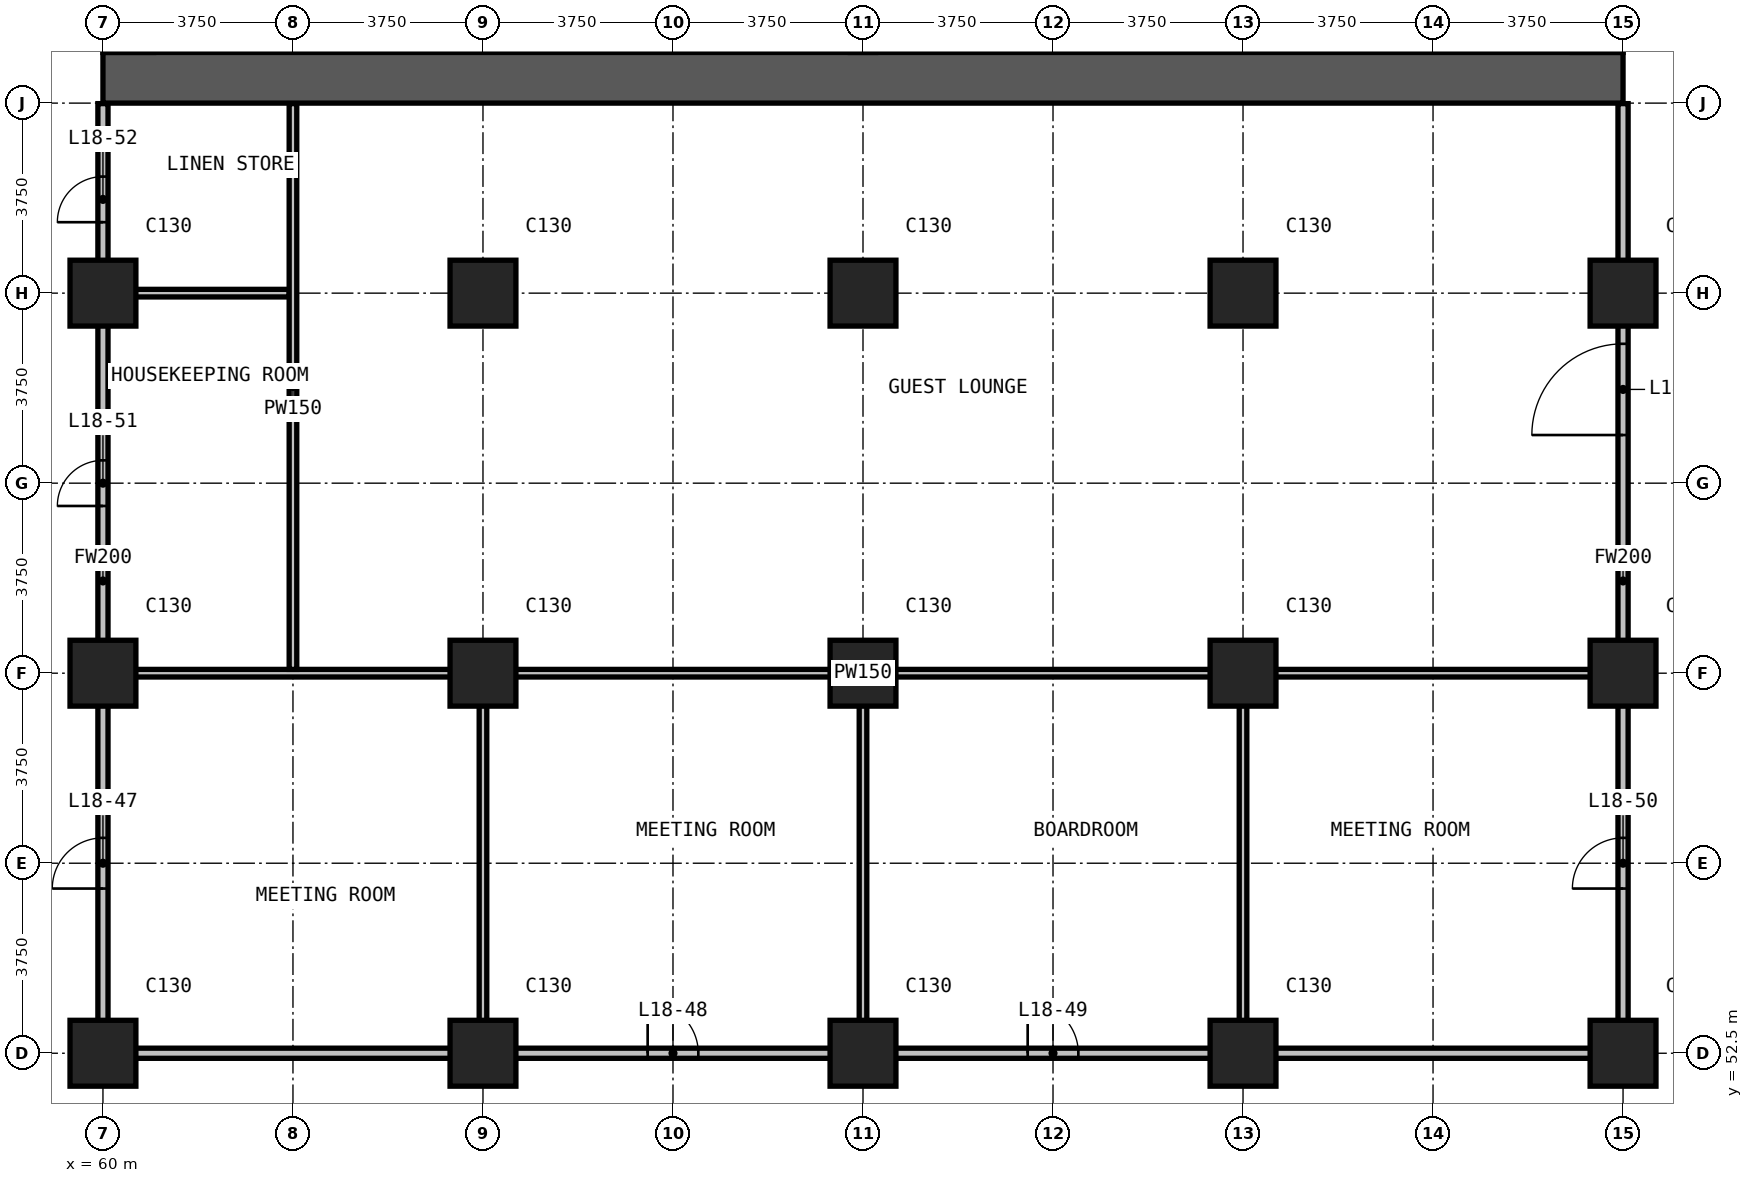
"""IFC4 building model, lengths in metres.
Left out: names, types, materials, properties, quantities, classifications, styles, units other than length and angle.
Written with IfcOpenShell. Run it as: python <this file> out.ifc"""

import sys

from ifc_helpers import new_model, si_unit, direction, frame, frame_2d, origin, origin_2d, place, context, subcontext, project, spatial, rectangle, extrude, element, fill, save


model = new_model("IFC4")
c1 = context("Model", 3, precision=1e-05, world=origin(), true_north=direction((0.0, 1.0)))
c2 = subcontext(c1, "Body", "Model", "MODEL_VIEW")
j1 = project(units=[si_unit("LENGTHUNIT", "METRE"), si_unit("PLANEANGLEUNIT", "RADIAN")], contexts=[c1])
p1 = place(None, origin())
s1 = spatial("IfcSite", under=j1, at=p1, CompositionType="ELEMENT")
p2 = place(p1, origin())
s2 = spatial("IfcBuilding", under=s1, at=p2, CompositionType="ELEMENT")
p3 = place(p2, frame((0.0, 0.0, 79.1)))
s3 = spatial("IfcBuildingStorey", under=s2, at=p3, CompositionType="ELEMENT", Elevation=79.1)
for number, where, z_axis, x_axis in (
    (1, (60.0, 52.5, 0.0), (0.0, 0.0, 1.0), (1.0, 0.0, 0.0)),
    (2, (60.0, 60.0, 0.0), (0.0, 0.0, 1.0), (1.0, 0.0, 0.0)),
    (3, (60.0, 67.5, 0.0), (0.0, 0.0, 1.0), (1.0, 0.0, 0.0)),
    (4, (67.5, 52.5, 0.0), (0.0, 0.0, 1.0), (1.0, 0.0, 0.0)),
    (5, (67.5, 60.0, 0.0), (0.0, 0.0, 1.0), (1.0, 0.0, 0.0)),
    (6, (67.5, 67.5, 0.0), (0.0, 0.0, 1.0), (1.0, 0.0, 0.0)),
    (7, (75.0, 52.5, 0.0), (0.0, 0.0, 1.0), (1.0, 0.0, 0.0)),
    (8, (75.0, 60.0, 0.0), (0.0, 0.0, 1.0), (1.0, 0.0, 0.0)),
    (9, (75.0, 67.5, 0.0), (0.0, 0.0, 1.0), (1.0, 0.0, 0.0)),
    (10, (82.5, 52.5, 0.0), (0.0, 0.0, 1.0), (1.0, 0.0, 0.0)),
    (11, (82.5, 60.0, 0.0), (0.0, 0.0, 1.0), (1.0, 0.0, 0.0)),
    (12, (82.5, 67.5, 0.0), (0.0, 0.0, 1.0), (1.0, 0.0, 0.0)),
    (13, (90.0, 52.5, 0.0), (0.0, 0.0, 1.0), (1.0, 0.0, 0.0)),
    (14, (90.0, 60.0, 0.0), (0.0, 0.0, 1.0), (1.0, 0.0, 0.0)),
    (15, (90.0, 67.5, 0.0), (0.0, 0.0, 1.0), (1.0, 0.0, 0.0)),
):
    element("IfcColumn", number, at=place(p3, frame(where, z_axis=z_axis, x_axis=x_axis)), inside=s3, PredefinedType="COLUMN", context=c2, shape_type="SweptSolid", body=[
        extrude(rectangle(XDim=1.3, YDim=1.3, at=origin_2d()), origin(), (0.0, 0.0, 1.0), 3.3),
    ])
p4 = place(p3, frame((60.0, 71.75, 0.0), z_axis=(0.0, 0.0, 1.0), x_axis=(1.0, 0.0, 0.0)))
e16 = element("IfcWall", 16, at=p4, inside=s3, PredefinedType="SHEAR", context=c2, shape_type="SweptSolid", body=[
    extrude(rectangle(XDim=30.0, YDim=1.0, at=frame_2d((15.0, 0.0))), origin(), (0.0, 0.0, 1.0), 3.3),
])
p5 = place(p3, frame((60.1, 52.5, 0.0), z_axis=(0.0, 0.0, 1.0), x_axis=(1.0, 0.0, 0.0)))
e17 = element("IfcWall", 17, at=p5, inside=s3, PredefinedType="PARTITIONING", context=c2, shape_type="SweptSolid", body=[
    extrude(rectangle(XDim=29.8, YDim=0.2, at=frame_2d((14.9, 0.0))), origin(), (0.0, 0.0, 1.0), 3.0),
])
p6 = place(p5, frame((10.65, 0.0, 0.0)))
e18 = element("IfcOpeningElement", 18, at=p6, cuts=e17, PredefinedType="OPENING", context=c2, shape_type="SweptSolid", body=[
    extrude(rectangle(XDim=1.0, YDim=2.2, at=frame_2d((0.5, 1.1))), frame((0.0, 0.11, 0.0), z_axis=(0.0, -1.0, 0.0), x_axis=(1.0, 0.0, 0.0)), (0.0, 0.0, 1.0), 0.22),
])
p7 = place(p5, frame((18.15, 0.0, 0.0)))
e19 = element("IfcOpeningElement", 19, at=p7, cuts=e17, PredefinedType="OPENING", context=c2, shape_type="SweptSolid", body=[
    extrude(rectangle(XDim=1.0, YDim=2.2, at=frame_2d((0.5, 1.1))), frame((0.0, 0.11, 0.0), z_axis=(0.0, -1.0, 0.0), x_axis=(1.0, 0.0, 0.0)), (0.0, 0.0, 1.0), 0.22),
])
p8 = place(p3, frame((60.0, 52.4, 0.0), z_axis=(0.0, 0.0, 1.0), x_axis=(0.0, 1.0, 0.0)))
e20 = element("IfcWall", 20, at=p8, inside=s3, PredefinedType="PARTITIONING", context=c2, shape_type="SweptSolid", body=[
    extrude(rectangle(XDim=18.84, YDim=0.2, at=frame_2d((9.42, 0.0))), origin(), (0.0, 0.0, 1.0), 3.0),
])
p9 = place(p8, frame((3.35, 0.0, 0.0)))
e21 = element("IfcOpeningElement", 21, at=p9, cuts=e20, PredefinedType="OPENING", context=c2, shape_type="SweptSolid", body=[
    extrude(rectangle(XDim=1.0, YDim=2.2, at=frame_2d((0.5, 1.1))), frame((0.0, 0.11, 0.0), z_axis=(0.0, -1.0, 0.0), x_axis=(1.0, 0.0, 0.0)), (0.0, 0.0, 1.0), 0.22),
])
p10 = place(p8, frame((10.9, 0.0, 0.0)))
e22 = element("IfcOpeningElement", 22, at=p10, cuts=e20, PredefinedType="OPENING", context=c2, shape_type="SweptSolid", body=[
    extrude(rectangle(XDim=0.9, YDim=2.2, at=frame_2d((0.45, 1.1))), frame((0.0, 0.11, 0.0), z_axis=(0.0, -1.0, 0.0), x_axis=(1.0, 0.0, 0.0)), (0.0, 0.0, 1.0), 0.22),
])
p11 = place(p8, frame((16.5, 0.0, 0.0)))
e23 = element("IfcOpeningElement", 23, at=p11, cuts=e20, PredefinedType="OPENING", context=c2, shape_type="SweptSolid", body=[
    extrude(rectangle(XDim=0.9, YDim=2.2, at=frame_2d((0.45, 1.1))), frame((0.0, 0.11, 0.0), z_axis=(0.0, -1.0, 0.0), x_axis=(1.0, 0.0, 0.0)), (0.0, 0.0, 1.0), 0.22),
])
p12 = place(p3, frame((90.0, 52.4, 0.0), z_axis=(0.0, 0.0, 1.0), x_axis=(0.0, 1.0, 0.0)))
e24 = element("IfcWall", 24, at=p12, inside=s3, PredefinedType="PARTITIONING", context=c2, shape_type="SweptSolid", body=[
    extrude(rectangle(XDim=18.84, YDim=0.2, at=frame_2d((9.42, 0.0))), origin(), (0.0, 0.0, 1.0), 3.0),
])
p13 = place(p12, frame((3.35, 0.0, 0.0)))
e25 = element("IfcOpeningElement", 25, at=p13, cuts=e24, PredefinedType="OPENING", context=c2, shape_type="SweptSolid", body=[
    extrude(rectangle(XDim=1.0, YDim=2.2, at=frame_2d((0.5, 1.1))), frame((0.0, 0.11, 0.0), z_axis=(0.0, -1.0, 0.0), x_axis=(1.0, 0.0, 0.0)), (0.0, 0.0, 1.0), 0.22),
])
p14 = place(p12, frame((12.3, 0.0, 0.0)))
e26 = element("IfcOpeningElement", 26, at=p14, cuts=e24, PredefinedType="OPENING", context=c2, shape_type="SweptSolid", body=[
    extrude(rectangle(XDim=1.8, YDim=2.2, at=frame_2d((0.9, 1.1))), frame((0.0, 0.11, 0.0), z_axis=(0.0, -1.0, 0.0), x_axis=(1.0, 0.0, 0.0)), (0.0, 0.0, 1.0), 0.22),
])
p15 = place(p3, frame((60.1, 60.0, 0.0), z_axis=(0.0, 0.0, 1.0), x_axis=(1.0, 0.0, 0.0)))
e27 = element("IfcWall", 27, at=p15, inside=s3, PredefinedType="PARTITIONING", context=c2, shape_type="SweptSolid", body=[
    extrude(rectangle(XDim=29.8, YDim=0.15, at=frame_2d((14.9, 0.0))), origin(), (0.0, 0.0, 1.0), 3.0),
])
p16 = place(p3, frame((60.1, 67.5, 0.0), z_axis=(0.0, 0.0, 1.0), x_axis=(1.0, 0.0, 0.0)))
e28 = element("IfcWall", 28, at=p16, inside=s3, PredefinedType="PARTITIONING", context=c2, shape_type="SweptSolid", body=[
    extrude(rectangle(XDim=3.575, YDim=0.15, at=frame_2d((1.788, 0.0))), origin(), (0.0, 0.0, 1.0), 3.0),
])
p17 = place(p3, frame((63.75, 60.075, 0.0), z_axis=(0.0, 0.0, 1.0), x_axis=(0.0, 1.0, 0.0)))
e29 = element("IfcWall", 29, at=p17, inside=s3, PredefinedType="PARTITIONING", context=c2, shape_type="SweptSolid", body=[
    extrude(rectangle(XDim=11.165, YDim=0.15, at=frame_2d((5.583, 0.0))), origin(), (0.0, 0.0, 1.0), 3.0),
])
for number, where, z_axis, x_axis in (
    (30, (67.5, 52.6, 0.0), (0.0, 0.0, 1.0), (0.0, 1.0, 0.0)),
    (31, (75.0, 52.6, 0.0), (0.0, 0.0, 1.0), (0.0, 1.0, 0.0)),
    (32, (82.5, 52.6, 0.0), (0.0, 0.0, 1.0), (0.0, 1.0, 0.0)),
):
    element("IfcWall", number, at=place(p3, frame(where, z_axis=z_axis, x_axis=x_axis)), inside=s3, PredefinedType="PARTITIONING", context=c2, shape_type="SweptSolid", body=[
        extrude(rectangle(XDim=7.325, YDim=0.15, at=frame_2d((3.663, 0.0))), origin(), (0.0, 0.0, 1.0), 3.0),
    ])
p18 = place(p9, origin())
e33 = element("IfcDoor", 33, at=p18, inside=s3, OperationType="SINGLE_SWING_LEFT", PredefinedType="DOOR", context=c2, shape_type="SweptSolid", body=[
    extrude(rectangle(XDim=1.0, YDim=2.2, at=frame_2d((0.5, 1.1))), frame((0.0, 0.025, 0.0), z_axis=(0.0, -1.0, 0.0), x_axis=(1.0, 0.0, 0.0)), (0.0, 0.0, 1.0), 0.05),
])
fill(e21, e33)
p19 = place(p6, origin())
e34 = element("IfcDoor", 34, at=p19, inside=s3, OperationType="SINGLE_SWING_LEFT", PredefinedType="DOOR", context=c2, shape_type="SweptSolid", body=[
    extrude(rectangle(XDim=1.0, YDim=2.2, at=frame_2d((0.5, 1.1))), frame((0.0, 0.025, 0.0), z_axis=(0.0, -1.0, 0.0), x_axis=(1.0, 0.0, 0.0)), (0.0, 0.0, 1.0), 0.05),
])
fill(e18, e34)
p20 = place(p7, origin())
e35 = element("IfcDoor", 35, at=p20, inside=s3, OperationType="SINGLE_SWING_LEFT", PredefinedType="DOOR", context=c2, shape_type="SweptSolid", body=[
    extrude(rectangle(XDim=1.0, YDim=2.2, at=frame_2d((0.5, 1.1))), frame((0.0, 0.025, 0.0), z_axis=(0.0, -1.0, 0.0), x_axis=(1.0, 0.0, 0.0)), (0.0, 0.0, 1.0), 0.05),
])
fill(e19, e35)
p21 = place(p13, origin())
e36 = element("IfcDoor", 36, at=p21, inside=s3, OperationType="SINGLE_SWING_RIGHT", PredefinedType="DOOR", context=c2, shape_type="SweptSolid", body=[
    extrude(rectangle(XDim=1.0, YDim=2.2, at=frame_2d((0.5, 1.1))), frame((0.0, 0.025, 0.0), z_axis=(0.0, -1.0, 0.0), x_axis=(1.0, 0.0, 0.0)), (0.0, 0.0, 1.0), 0.05),
])
fill(e25, e36)
p22 = place(p10, origin())
e37 = element("IfcDoor", 37, at=p22, inside=s3, OperationType="SINGLE_SWING_RIGHT", PredefinedType="DOOR", context=c2, shape_type="SweptSolid", body=[
    extrude(rectangle(XDim=0.9, YDim=2.2, at=frame_2d((0.45, 1.1))), frame((0.0, 0.025, 0.0), z_axis=(0.0, -1.0, 0.0), x_axis=(1.0, 0.0, 0.0)), (0.0, 0.0, 1.0), 0.05),
])
fill(e22, e37)
p23 = place(p11, origin())
e38 = element("IfcDoor", 38, at=p23, inside=s3, OperationType="SINGLE_SWING_LEFT", PredefinedType="DOOR", context=c2, shape_type="SweptSolid", body=[
    extrude(rectangle(XDim=0.9, YDim=2.2, at=frame_2d((0.45, 1.1))), frame((0.0, 0.025, 0.0), z_axis=(0.0, -1.0, 0.0), x_axis=(1.0, 0.0, 0.0)), (0.0, 0.0, 1.0), 0.05),
])
fill(e23, e38)
p24 = place(p14, origin())
e39 = element("IfcDoor", 39, at=p24, inside=s3, OperationType="DOUBLE_DOOR_SINGLE_SWING", PredefinedType="DOOR", context=c2, shape_type="SweptSolid", body=[
    extrude(rectangle(XDim=1.8, YDim=2.2, at=frame_2d((0.9, 1.1))), frame((0.0, 0.025, 0.0), z_axis=(0.0, -1.0, 0.0), x_axis=(1.0, 0.0, 0.0)), (0.0, 0.0, 1.0), 0.05),
])
fill(e26, e39)
save(model, sys.argv[1])
